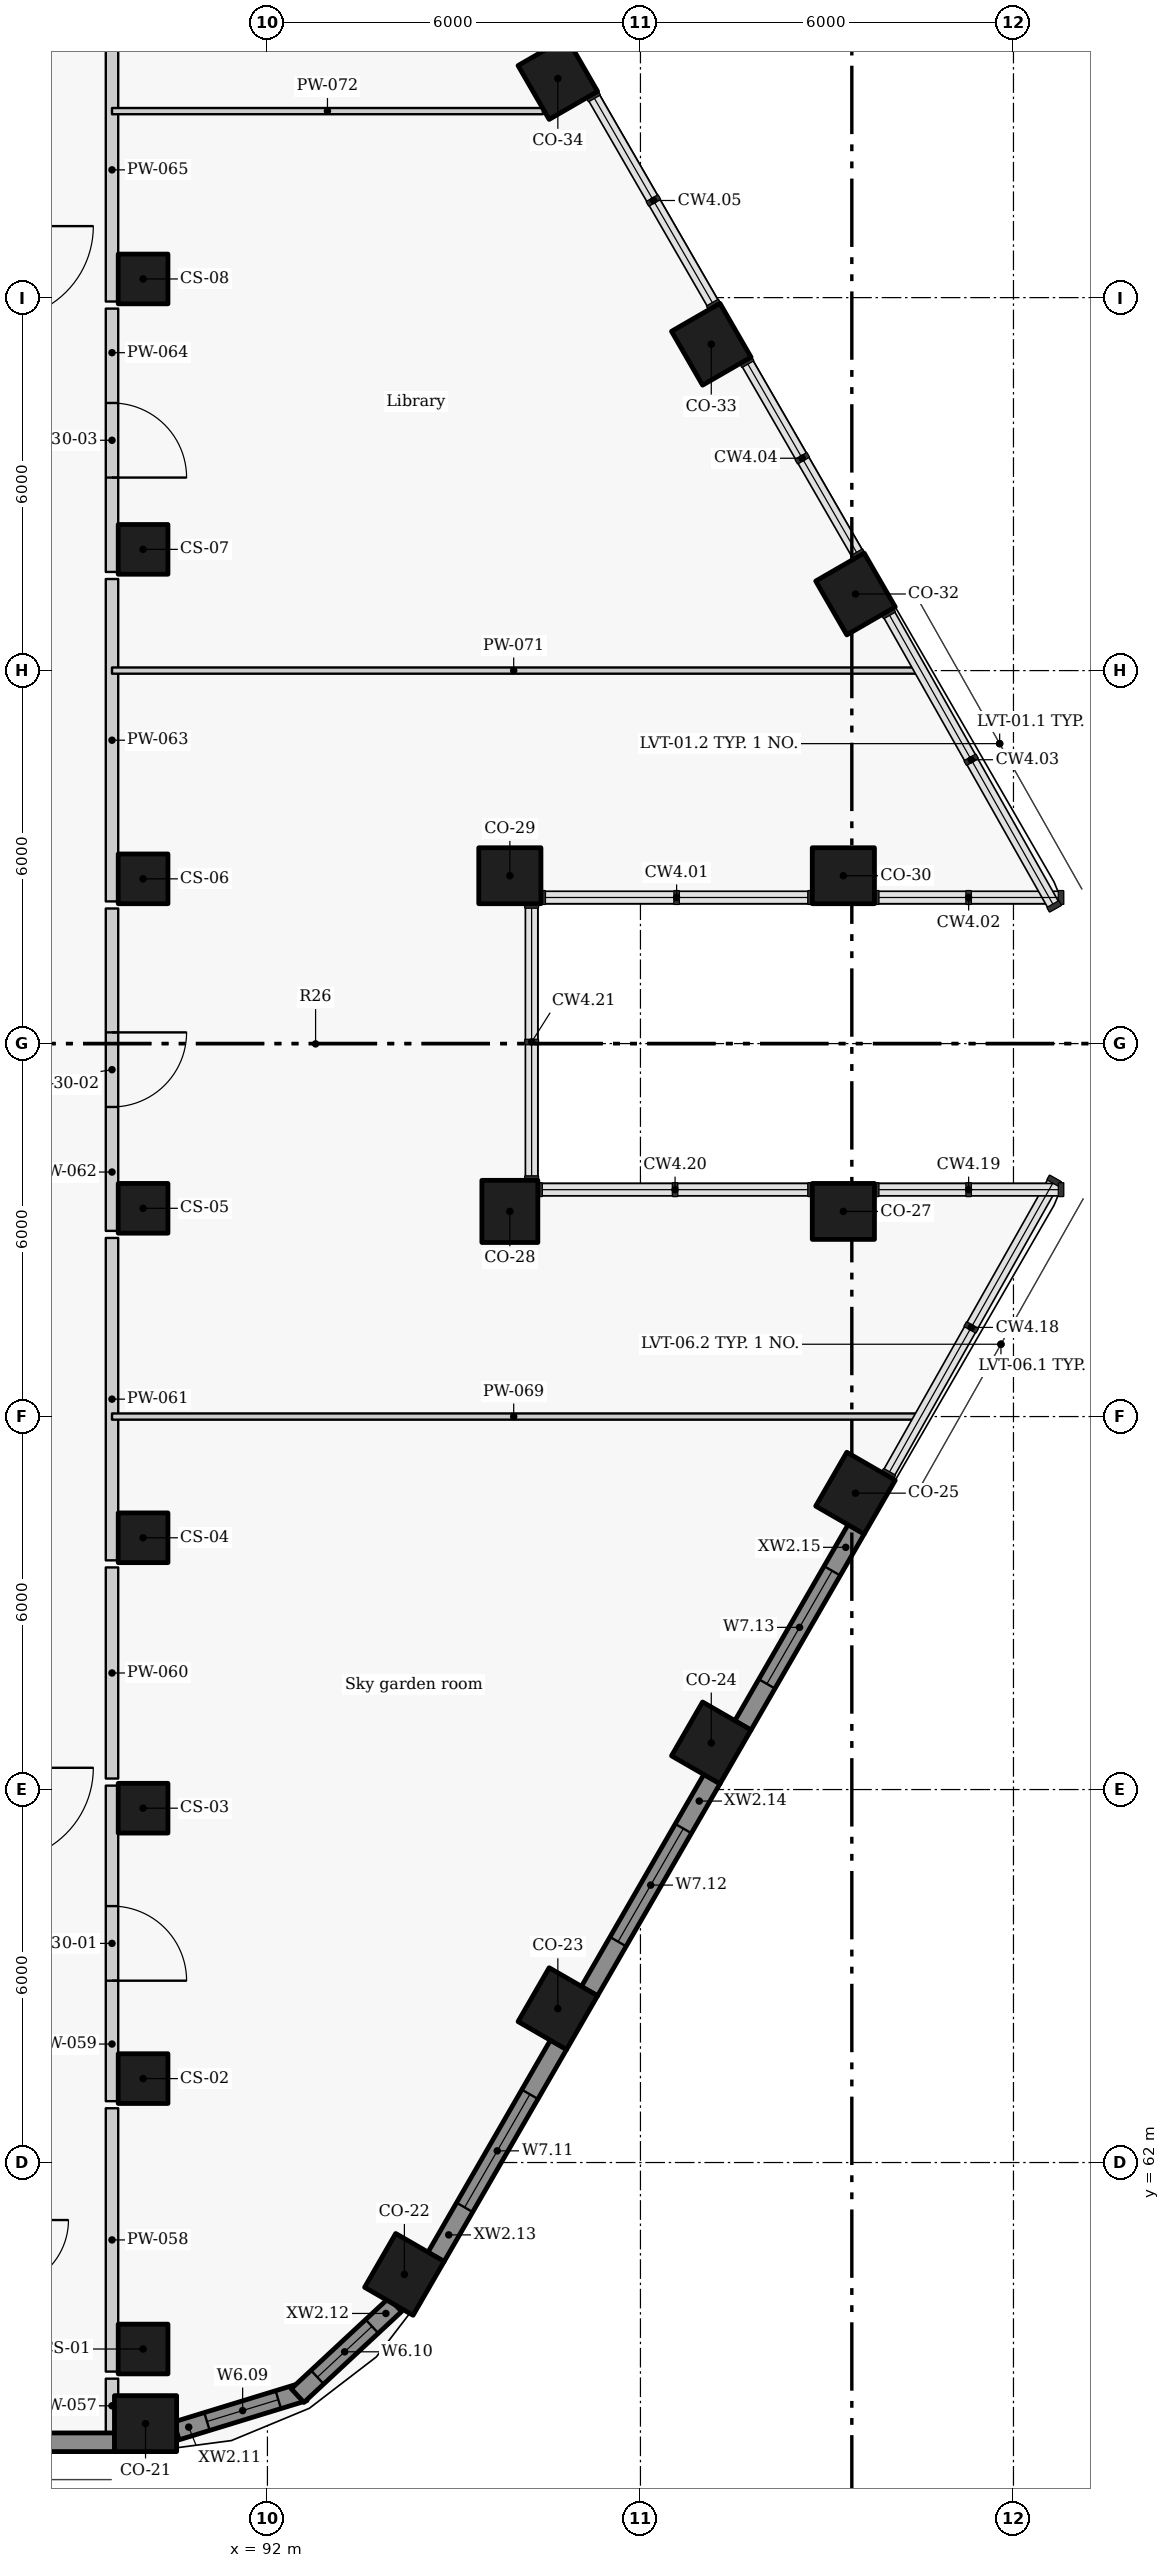
"""IFC4 building model, lengths in metres.
Left out: names, types, materials, properties, quantities, classifications, styles, units other than length and angle.
Written with IfcOpenShell. Run it as: python <this file> out.ifc"""

import sys

from ifc_helpers import new_model, si_unit, direction, frame, frame_2d, origin, origin_2d, place, context, subcontext, project, spatial, rectangle, extrude, element, fill, save


model = new_model("IFC4")
c1 = context("Model", 3, precision=1e-05, world=origin(), true_north=direction((0.0, 1.0)))
c2 = subcontext(c1, "Body", "Model", "MODEL_VIEW")
j1 = project(units=[si_unit("LENGTHUNIT", "METRE"), si_unit("PLANEANGLEUNIT", "RADIAN")], contexts=[c1])
p1 = place(None, origin())
s1 = spatial("IfcSite", under=j1, at=p1, CompositionType="ELEMENT")
p2 = place(p1, origin())
s2 = spatial("IfcBuilding", under=s1, at=p2, CompositionType="ELEMENT")
p3 = place(p2, frame((0.0, 0.0, 272.4)))
s3 = spatial("IfcBuildingStorey", under=s2, at=p3, CompositionType="ELEMENT", Elevation=272.4)
for number, where, z_axis, x_axis in (
    (1, (90.04, 57.8, 0.0), (0.0, 0.0, 1.0), (1.0, 0.0, 0.0)),
    (2, (94.203, 60.2, 0.0), (0.0, 0.0, 1.0), (0.5, 0.866, 0.0)),
    (3, (96.671, 64.475, 0.0), (0.0, 0.0, 1.0), (0.5, 0.866, 0.0)),
    (4, (99.139, 68.75, 0.0), (0.0, 0.0, 1.0), (0.5, 0.866, 0.0)),
    (5, (101.459, 72.768, 0.0), (0.0, 0.0, 1.0), (0.5, 0.866, 0.0)),
    (6, (101.264, 77.3, 0.0), (0.0, 0.0, 1.0), (-1.0, 0.0, 0.0)),
    (7, (95.899, 77.3, 0.0), (0.0, 0.0, 1.0), (0.0, 1.0, 0.0)),
    (8, (95.899, 82.7, 0.0), (0.0, 0.0, 1.0), (1.0, 0.0, 0.0)),
    (9, (101.264, 82.7, 0.0), (0.0, 0.0, 1.0), (1.0, 0.0, 0.0)),
    (10, (101.459, 87.232, 0.0), (0.0, 0.0, 1.0), (-0.5, 0.866, 0.0)),
    (11, (99.139, 91.25, 0.0), (0.0, 0.0, 1.0), (-0.5, 0.866, 0.0)),
    (12, (96.671, 95.525, 0.0), (0.0, 0.0, 1.0), (-0.5, 0.866, 0.0)),
):
    element("IfcColumn", number, at=place(p3, frame(where, z_axis=z_axis, x_axis=x_axis)), inside=s3, PredefinedType="COLUMN", context=c2, shape_type="SweptSolid", body=[
        extrude(rectangle(XDim=1.0, YDim=0.9, at=origin_2d()), origin(), (0.0, 0.0, 1.0), 3.6),
    ])
for number, where, z_axis, x_axis in (
    (13, (90.0, 59.0, 0.0), (0.0, 0.0, 1.0), (0.0, 1.0, 0.0)),
    (14, (90.0, 63.35, 0.0), (0.0, 0.0, 1.0), (0.0, 1.0, 0.0)),
    (15, (90.0, 67.7, 0.0), (0.0, 0.0, 1.0), (0.0, 1.0, 0.0)),
    (16, (90.0, 72.05, 0.0), (0.0, 0.0, 1.0), (0.0, 1.0, 0.0)),
    (17, (90.0, 77.35, 0.0), (0.0, 0.0, 1.0), (0.0, 1.0, 0.0)),
    (18, (90.0, 82.65, 0.0), (0.0, 0.0, 1.0), (0.0, 1.0, 0.0)),
    (19, (90.0, 87.95, 0.0), (0.0, 0.0, 1.0), (0.0, 1.0, 0.0)),
    (20, (90.0, 92.3, 0.0), (0.0, 0.0, 1.0), (0.0, 1.0, 0.0)),
):
    element("IfcColumn", number, at=place(p3, frame(where, z_axis=z_axis, x_axis=x_axis)), inside=s3, PredefinedType="COLUMN", context=c2, shape_type="SweptSolid", body=[
        extrude(rectangle(XDim=0.8, YDim=0.8, at=origin_2d()), origin(), (0.0, 0.0, 1.0), 3.6),
    ])
p4 = place(p3, frame((70.451, 57.5, 0.0), z_axis=(0.0, 0.0, 1.0), x_axis=(1.0, 0.0, 0.0)))
e21 = element("IfcWall", 21, at=p4, inside=s3, PredefinedType="SOLIDWALL", context=c2, shape_type="SweptSolid", body=[
    extrude(rectangle(XDim=19.093, YDim=0.3, at=frame_2d((9.546, 0.0))), origin(), (0.0, 0.0, 1.0), 2.725),
])
p5 = place(p3, frame((90.536, 57.683, 0.0), z_axis=(0.0, 0.0, 1.0), x_axis=(0.956094906027, 0.293057213987, 0.0)))
e22 = element("IfcWall", 22, at=p5, inside=s3, PredefinedType="SOLIDWALL", context=c2, shape_type="SweptSolid", body=[
    extrude(rectangle(XDim=2.152, YDim=0.3, at=frame_2d((1.076, 0.0))), origin(), (0.0, 0.0, 1.0), 2.725),
])
p6 = place(p5, frame((0.514, 0.0, 0.9)))
e23 = element("IfcOpeningElement", 23, at=p6, cuts=e22, PredefinedType="OPENING", context=c2, shape_type="SweptSolid", body=[
    extrude(rectangle(XDim=1.2, YDim=1.1, at=frame_2d((0.6, 0.55))), frame((0.0, 0.16, 0.0), z_axis=(0.0, -1.0, 0.0), x_axis=(1.0, 0.0, 0.0)), (0.0, 0.0, 1.0), 0.32),
])
p7 = place(p3, frame((92.485, 58.25, 0.0), z_axis=(0.0, 0.0, 1.0), x_axis=(0.732075899412, 0.681223074697, 0.0)))
e24 = element("IfcWall", 24, at=p7, inside=s3, PredefinedType="SOLIDWALL", context=c2, shape_type="SweptSolid", body=[
    extrude(rectangle(XDim=2.146, YDim=0.3, at=frame_2d((1.073, 0.0))), origin(), (0.0, 0.0, 1.0), 2.725),
])
p8 = place(p7, frame((0.435, 0.0, 0.9)))
e25 = element("IfcOpeningElement", 25, at=p8, cuts=e24, PredefinedType="OPENING", context=c2, shape_type="SweptSolid", body=[
    extrude(rectangle(XDim=1.2, YDim=1.1, at=frame_2d((0.6, 0.55))), frame((0.0, 0.16, 0.0), z_axis=(0.0, -1.0, 0.0), x_axis=(1.0, 0.0, 0.0)), (0.0, 0.0, 1.0), 0.32),
])
p9 = place(p3, frame((94.711, 60.48, 0.0), z_axis=(0.0, 0.0, 1.0), x_axis=(0.499986771468, 0.866033041146, 0.0)))
e26 = element("IfcWall", 26, at=p9, inside=s3, PredefinedType="SOLIDWALL", context=c2, shape_type="SweptSolid", body=[
    extrude(rectangle(XDim=3.944, YDim=0.3, at=frame_2d((1.972, 0.0))), origin(), (0.0, 0.0, 1.0), 2.725),
])
p10 = place(p9, frame((0.922, 0.0, 0.9)))
e27 = element("IfcOpeningElement", 27, at=p10, cuts=e26, PredefinedType="OPENING", context=c2, shape_type="SweptSolid", body=[
    extrude(rectangle(XDim=2.1, YDim=1.1, at=frame_2d((1.05, 0.55))), frame((0.0, 0.16, 0.0), z_axis=(0.0, -1.0, 0.0), x_axis=(1.0, 0.0, 0.0)), (0.0, 0.0, 1.0), 0.32),
])
p11 = place(p3, frame((97.179, 64.755, 0.0), z_axis=(0.0, 0.0, 1.0), x_axis=(0.500013573458, 0.866017567003, 0.0)))
e28 = element("IfcWall", 28, at=p11, inside=s3, PredefinedType="SOLIDWALL", context=c2, shape_type="SweptSolid", body=[
    extrude(rectangle(XDim=3.944, YDim=0.3, at=frame_2d((1.972, 0.0))), origin(), (0.0, 0.0, 1.0), 2.725),
])
p12 = place(p11, frame((0.922, 0.0, 0.9)))
e29 = element("IfcOpeningElement", 29, at=p12, cuts=e28, PredefinedType="OPENING", context=c2, shape_type="SweptSolid", body=[
    extrude(rectangle(XDim=2.1, YDim=1.1, at=frame_2d((1.05, 0.55))), frame((0.0, 0.16, 0.0), z_axis=(0.0, -1.0, 0.0), x_axis=(1.0, 0.0, 0.0)), (0.0, 0.0, 1.0), 0.32),
])
p13 = place(p3, frame((99.647, 69.03, 0.0), z_axis=(0.0, 0.0, 1.0), x_axis=(0.499990941067, 0.866030633898, 0.0)))
e30 = element("IfcWall", 30, at=p13, inside=s3, PredefinedType="SOLIDWALL", context=c2, shape_type="SweptSolid", body=[
    extrude(rectangle(XDim=3.647, YDim=0.3, at=frame_2d((1.823, 0.0))), origin(), (0.0, 0.0, 1.0), 2.725),
])
p14 = place(p13, frame((0.773, 0.0, 0.9)))
e31 = element("IfcOpeningElement", 31, at=p14, cuts=e30, PredefinedType="OPENING", context=c2, shape_type="SweptSolid", body=[
    extrude(rectangle(XDim=2.1, YDim=1.1, at=frame_2d((1.05, 0.55))), frame((0.0, 0.16, 0.0), z_axis=(0.0, -1.0, 0.0), x_axis=(1.0, 0.0, 0.0)), (0.0, 0.0, 1.0), 0.32),
])
p15 = place(p3, frame((89.5, 57.65, 0.0), z_axis=(0.0, 0.0, 1.0), x_axis=(0.0, 1.0, 0.0)))
e32 = element("IfcWall", 32, at=p15, inside=s3, PredefinedType="PARTITIONING", context=c2, shape_type="SweptSolid", body=[
    extrude(rectangle(XDim=0.873, YDim=0.2, at=frame_2d((0.437, 0.0))), origin(), (0.0, 0.0, 1.0), 3.325),
])
p16 = place(p3, frame((89.5, 58.637, 0.0), z_axis=(0.0, 0.0, 1.0), x_axis=(0.0, 1.0, 0.0)))
e33 = element("IfcWall", 33, at=p16, inside=s3, PredefinedType="PARTITIONING", context=c2, shape_type="SweptSolid", body=[
    extrude(rectangle(XDim=4.236, YDim=0.2, at=frame_2d((2.118, 0.0))), origin(), (0.0, 0.0, 1.0), 3.325),
])
p17 = place(p3, frame((89.5, 68.063, 0.0), z_axis=(0.0, 0.0, 1.0), x_axis=(0.0, -1.0, 0.0)))
e34 = element("IfcWall", 34, at=p17, inside=s3, PredefinedType="PARTITIONING", context=c2, shape_type="SweptSolid", body=[
    extrude(rectangle(XDim=5.076, YDim=0.2, at=frame_2d((2.538, 0.0))), origin(), (0.0, 0.0, 1.0), 3.325),
])
p18 = place(p17, frame((1.938, 0.0, 0.0)))
e35 = element("IfcOpeningElement", 35, at=p18, cuts=e34, PredefinedType="OPENING", context=c2, shape_type="SweptSolid", body=[
    extrude(rectangle(XDim=1.2, YDim=2.1, at=frame_2d((0.6, 1.05))), frame((0.0, 0.11, 0.0), z_axis=(0.0, -1.0, 0.0), x_axis=(1.0, 0.0, 0.0)), (0.0, 0.0, 1.0), 0.22),
])
p19 = place(p3, frame((89.5, 68.177, 0.0), z_axis=(0.0, 0.0, 1.0), x_axis=(0.0, 1.0, 0.0)))
e36 = element("IfcWall", 36, at=p19, inside=s3, PredefinedType="PARTITIONING", context=c2, shape_type="SweptSolid", body=[
    extrude(rectangle(XDim=3.396, YDim=0.2, at=frame_2d((1.698, 0.0))), origin(), (0.0, 0.0, 1.0), 3.325),
])
p20 = place(p3, frame((89.5, 71.687, 0.0), z_axis=(0.0, 0.0, 1.0), x_axis=(0.0, 1.0, 0.0)))
e37 = element("IfcWall", 37, at=p20, inside=s3, PredefinedType="PARTITIONING", context=c2, shape_type="SweptSolid", body=[
    extrude(rectangle(XDim=5.186, YDim=0.2, at=frame_2d((2.593, 0.0))), origin(), (0.0, 0.0, 1.0), 3.325),
])
p21 = place(p3, frame((89.5, 82.173, 0.0), z_axis=(0.0, 0.0, 1.0), x_axis=(0.0, -1.0, 0.0)))
e38 = element("IfcWall", 38, at=p21, inside=s3, PredefinedType="PARTITIONING", context=c2, shape_type="SweptSolid", body=[
    extrude(rectangle(XDim=5.186, YDim=0.2, at=frame_2d((2.593, 0.0))), origin(), (0.0, 0.0, 1.0), 3.325),
])
p22 = place(p21, frame((1.993, 0.0, 0.0)))
e39 = element("IfcOpeningElement", 39, at=p22, cuts=e38, PredefinedType="OPENING", context=c2, shape_type="SweptSolid", body=[
    extrude(rectangle(XDim=1.2, YDim=2.1, at=frame_2d((0.6, 1.05))), frame((0.0, 0.11, 0.0), z_axis=(0.0, -1.0, 0.0), x_axis=(1.0, 0.0, 0.0)), (0.0, 0.0, 1.0), 0.22),
])
p23 = place(p3, frame((89.5, 82.287, 0.0), z_axis=(0.0, 0.0, 1.0), x_axis=(0.0, 1.0, 0.0)))
e40 = element("IfcWall", 40, at=p23, inside=s3, PredefinedType="PARTITIONING", context=c2, shape_type="SweptSolid", body=[
    extrude(rectangle(XDim=5.186, YDim=0.2, at=frame_2d((2.593, 0.0))), origin(), (0.0, 0.0, 1.0), 3.325),
])
p24 = place(p3, frame((89.5, 91.823, 0.0), z_axis=(0.0, 0.0, 1.0), x_axis=(0.0, -1.0, 0.0)))
e41 = element("IfcWall", 41, at=p24, inside=s3, PredefinedType="PARTITIONING", context=c2, shape_type="SweptSolid", body=[
    extrude(rectangle(XDim=4.236, YDim=0.2, at=frame_2d((2.118, 0.0))), origin(), (0.0, 0.0, 1.0), 3.325),
])
p25 = place(p24, frame((1.518, 0.0, 0.0)))
e42 = element("IfcOpeningElement", 42, at=p25, cuts=e41, PredefinedType="OPENING", context=c2, shape_type="SweptSolid", body=[
    extrude(rectangle(XDim=1.2, YDim=2.1, at=frame_2d((0.6, 1.05))), frame((0.0, 0.11, 0.0), z_axis=(0.0, -1.0, 0.0), x_axis=(1.0, 0.0, 0.0)), (0.0, 0.0, 1.0), 0.22),
])
p26 = place(p3, frame((89.5, 91.937, 0.0), z_axis=(0.0, 0.0, 1.0), x_axis=(0.0, 1.0, 0.0)))
e43 = element("IfcWall", 43, at=p26, inside=s3, PredefinedType="PARTITIONING", context=c2, shape_type="SweptSolid", body=[
    extrude(rectangle(XDim=4.236, YDim=0.2, at=frame_2d((2.118, 0.0))), origin(), (0.0, 0.0, 1.0), 3.325),
])
for number, where, z_axis, x_axis in (
    (44, (89.5, 74.0, 0.0), (0.0, 0.0, 1.0), (1.0, 0.0, 0.0)),
    (45, (89.5, 86.0, 0.0), (0.0, 0.0, 1.0), (1.0, 0.0, 0.0)),
):
    element("IfcWall", number, at=place(p3, frame(where, z_axis=z_axis, x_axis=x_axis)), inside=s3, PredefinedType="PARTITIONING", context=c2, shape_type="SweptSolid", body=[
        extrude(rectangle(XDim=12.922, YDim=0.1, at=frame_2d((6.461, 0.0))), origin(), (0.0, 0.0, 1.0), 3.325),
    ])
p27 = place(p3, frame((89.5, 95.0, 0.0), z_axis=(0.0, 0.0, 1.0), x_axis=(1.0, 0.0, 0.0)))
e46 = element("IfcWall", 46, at=p27, inside=s3, PredefinedType="PARTITIONING", context=c2, shape_type="SweptSolid", body=[
    extrude(rectangle(XDim=6.931, YDim=0.1, at=frame_2d((3.466, 0.0))), origin(), (0.0, 0.0, 1.0), 2.805),
])
p28 = place(p6, origin())
e47 = element("IfcWindow", 47, at=p28, inside=s3, PartitioningType="SINGLE_PANEL", PredefinedType="WINDOW", context=c2, shape_type="SweptSolid", body=[
    extrude(rectangle(XDim=1.2, YDim=1.1, at=frame_2d((0.6, 0.55))), frame((0.0, 0.03, 0.0), z_axis=(0.0, -1.0, 0.0), x_axis=(1.0, 0.0, 0.0)), (0.0, 0.0, 1.0), 0.06),
])
fill(e23, e47)
p29 = place(p8, origin())
e48 = element("IfcWindow", 48, at=p29, inside=s3, PartitioningType="SINGLE_PANEL", PredefinedType="WINDOW", context=c2, shape_type="SweptSolid", body=[
    extrude(rectangle(XDim=1.2, YDim=1.1, at=frame_2d((0.6, 0.55))), frame((0.0, 0.03, 0.0), z_axis=(0.0, -1.0, 0.0), x_axis=(1.0, 0.0, 0.0)), (0.0, 0.0, 1.0), 0.06),
])
fill(e25, e48)
p30 = place(p10, origin())
e49 = element("IfcWindow", 49, at=p30, inside=s3, PartitioningType="SINGLE_PANEL", PredefinedType="WINDOW", context=c2, shape_type="SweptSolid", body=[
    extrude(rectangle(XDim=2.1, YDim=1.1, at=frame_2d((1.05, 0.55))), frame((0.0, 0.03, 0.0), z_axis=(0.0, -1.0, 0.0), x_axis=(1.0, 0.0, 0.0)), (0.0, 0.0, 1.0), 0.06),
])
fill(e27, e49)
p31 = place(p12, origin())
e50 = element("IfcWindow", 50, at=p31, inside=s3, PartitioningType="SINGLE_PANEL", PredefinedType="WINDOW", context=c2, shape_type="SweptSolid", body=[
    extrude(rectangle(XDim=2.1, YDim=1.1, at=frame_2d((1.05, 0.55))), frame((0.0, 0.03, 0.0), z_axis=(0.0, -1.0, 0.0), x_axis=(1.0, 0.0, 0.0)), (0.0, 0.0, 1.0), 0.06),
])
fill(e29, e50)
p32 = place(p14, origin())
e51 = element("IfcWindow", 51, at=p32, inside=s3, PartitioningType="SINGLE_PANEL", PredefinedType="WINDOW", context=c2, shape_type="SweptSolid", body=[
    extrude(rectangle(XDim=2.1, YDim=1.1, at=frame_2d((1.05, 0.55))), frame((0.0, 0.03, 0.0), z_axis=(0.0, -1.0, 0.0), x_axis=(1.0, 0.0, 0.0)), (0.0, 0.0, 1.0), 0.06),
])
fill(e31, e51)
p33 = place(p18, origin())
e52 = element("IfcDoor", 52, at=p33, inside=s3, OperationType="SINGLE_SWING_RIGHT", PredefinedType="DOOR", context=c2, shape_type="SweptSolid", body=[
    extrude(rectangle(XDim=1.2, YDim=2.1, at=frame_2d((0.6, 1.05))), frame((0.0, 0.025, 0.0), z_axis=(0.0, -1.0, 0.0), x_axis=(1.0, 0.0, 0.0)), (0.0, 0.0, 1.0), 0.05),
])
fill(e35, e52)
p34 = place(p22, origin())
e53 = element("IfcDoor", 53, at=p34, inside=s3, OperationType="SINGLE_SWING_LEFT", PredefinedType="DOOR", context=c2, shape_type="SweptSolid", body=[
    extrude(rectangle(XDim=1.2, YDim=2.1, at=frame_2d((0.6, 1.05))), frame((0.0, 0.025, 0.0), z_axis=(0.0, -1.0, 0.0), x_axis=(1.0, 0.0, 0.0)), (0.0, 0.0, 1.0), 0.05),
])
fill(e39, e53)
p35 = place(p25, origin())
e54 = element("IfcDoor", 54, at=p35, inside=s3, OperationType="SINGLE_SWING_RIGHT", PredefinedType="DOOR", context=c2, shape_type="SweptSolid", body=[
    extrude(rectangle(XDim=1.2, YDim=2.1, at=frame_2d((0.6, 1.05))), frame((0.0, 0.025, 0.0), z_axis=(0.0, -1.0, 0.0), x_axis=(1.0, 0.0, 0.0)), (0.0, 0.0, 1.0), 0.05),
])
fill(e42, e54)
save(model, sys.argv[1])
